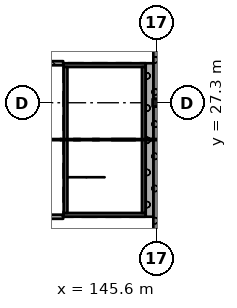
"""IFC4 building model, lengths in metres.
Left out: names, types, materials, properties, quantities, classifications, styles, units other than length and angle.
Written with IfcOpenShell. Run it as: python <this file> out.ifc"""

import sys

from ifc_helpers import new_model, si_unit, direction, frame, frame_2d, origin, origin_2d, place, context, subcontext, project, spatial, rectangle, extrude, element, fill, save


model = new_model("IFC4")
c1 = context("Model", 3, precision=1e-05, world=origin(), true_north=direction((0.0, 1.0)))
c2 = subcontext(c1, "Body", "Model", "MODEL_VIEW")
j1 = project(units=[si_unit("LENGTHUNIT", "METRE"), si_unit("PLANEANGLEUNIT", "RADIAN")], contexts=[c1])
p1 = place(None, origin())
s1 = spatial("IfcSite", under=j1, at=p1, CompositionType="ELEMENT")
p2 = place(p1, origin())
s2 = spatial("IfcBuilding", under=s1, at=p2, CompositionType="ELEMENT")
p3 = place(p2, frame((0.0, 0.0, 29.12)))
s3 = spatial("IfcBuildingStorey", under=s2, at=p3, CompositionType="ELEMENT", Elevation=29.12)
p4 = place(p3, frame((145.6, 27.3, 0.0), z_axis=(0.0, 0.0, 1.0), x_axis=(1.0, 0.0, 0.0)))
e1 = element("IfcColumn", 1, at=p4, inside=s3, PredefinedType="COLUMN", context=c2, shape_type="SweptSolid", body=[
    extrude(rectangle(XDim=0.5, YDim=0.5, at=origin_2d()), origin(), (0.0, 0.0, 1.0), 4.55),
])
p5 = place(p3, frame((144.9, 19.925, 0.0), z_axis=(0.0, 0.0, 1.0), x_axis=(-1.0, 0.0, 0.0)))
e2 = element("IfcWall", 2, at=p5, inside=s3, PredefinedType="SHEAR", context=c2, shape_type="SweptSolid", body=[
    extrude(rectangle(XDim=5.4, YDim=0.25, at=frame_2d((2.7, 0.0))), origin(), (0.0, 0.0, 1.0), 4.55),
])
p6 = place(p5, frame((1.5, 0.0, 0.0)))
e3 = element("IfcOpeningElement", 3, at=p6, cuts=e2, PredefinedType="OPENING", context=c2, shape_type="SweptSolid", body=[
    extrude(rectangle(XDim=2.4, YDim=2.1, at=frame_2d((1.2, 1.05))), frame((0.0, 0.135, 0.0), z_axis=(0.0, -1.0, 0.0), x_axis=(1.0, 0.0, 0.0)), (0.0, 0.0, 1.0), 0.27),
])
p7 = place(p3, frame((144.9, 29.775, 0.0), z_axis=(0.0, 0.0, 1.0), x_axis=(-1.0, 0.0, 0.0)))
e4 = element("IfcWall", 4, at=p7, inside=s3, PredefinedType="SHEAR", context=c2, shape_type="SweptSolid", body=[
    extrude(rectangle(XDim=5.4, YDim=0.25, at=frame_2d((2.7, 0.0))), origin(), (0.0, 0.0, 1.0), 4.55),
])
for number, where, z_axis, x_axis in (
    (5, (139.625, 29.65, 0.0), (0.0, 0.0, 1.0), (0.0, -1.0, 0.0)),
    (6, (144.775, 29.65, 0.0), (0.0, 0.0, 1.0), (0.0, -1.0, 0.0)),
):
    element("IfcWall", number, at=place(p3, frame(where, z_axis=z_axis, x_axis=x_axis)), inside=s3, PredefinedType="SHEAR", context=c2, shape_type="SweptSolid", body=[
        extrude(rectangle(XDim=9.6, YDim=0.25, at=frame_2d((4.8, 0.0))), origin(), (0.0, 0.0, 1.0), 4.55),
    ])
p8 = place(p3, frame((145.575, 18.45, 0.0), z_axis=(0.0, 0.0, 1.0), x_axis=(0.0, 1.0, 0.0)))
e7 = element("IfcWall", 7, at=p8, inside=s3, PredefinedType="SOLIDWALL", context=c2, shape_type="SweptSolid", body=[
    extrude(rectangle(XDim=8.6, YDim=0.35, at=frame_2d((4.3, 0.0))), origin(), (0.0, 0.0, 1.0), 4.5),
])
p9 = place(p3, frame((145.575, 27.55, 0.0), z_axis=(0.0, 0.0, 1.0), x_axis=(0.0, 1.0, 0.0)))
e8 = element("IfcWall", 8, at=p9, inside=s3, PredefinedType="SOLIDWALL", context=c2, shape_type="SweptSolid", body=[
    extrude(rectangle(XDim=8.6, YDim=0.35, at=frame_2d((4.3, 0.0))), origin(), (0.0, 0.0, 1.0), 4.5),
])
p10 = place(p3, frame((145.15, 19.8, 0.0), z_axis=(0.0, 0.0, 1.0), x_axis=(0.0, 1.0, 0.0)))
e9 = element("IfcWall", 9, at=p10, inside=s3, PredefinedType="SOLIDWALL", context=c2, shape_type="SweptSolid", body=[
    extrude(rectangle(XDim=10.1, YDim=0.5, at=frame_2d((5.05, 0.0))), origin(), (0.0, 0.0, 1.0), 4.55),
])
p11 = place(p3, frame((135.83, 29.9, 0.0), z_axis=(0.0, 0.0, 1.0), x_axis=(1.0, 0.0, 0.0)))
e10 = element("IfcWall", 10, at=p11, inside=s3, PredefinedType="SOLIDWALL", context=c2, shape_type="SweptSolid", body=[
    extrude(rectangle(XDim=3.64, YDim=0.275, at=frame_2d((1.82, 0.0))), origin(), (0.0, 0.0, 1.0), 3.88),
])
p12 = place(p3, frame((136.613, 19.8, 0.0), z_axis=(0.0, 0.0, 1.0), x_axis=(1.0, 0.0, 0.0)))
e11 = element("IfcWall", 11, at=p12, inside=s3, PredefinedType="SOLIDWALL", context=c2, shape_type="SweptSolid", body=[
    extrude(rectangle(XDim=2.857, YDim=0.275, at=frame_2d((1.429, 0.0))), origin(), (0.0, 0.0, 1.0), 3.88),
])
p13 = place(p12, frame((0.85, 0.0, 0.0)))
e12 = element("IfcOpeningElement", 12, at=p13, cuts=e11, PredefinedType="OPENING", context=c2, shape_type="SweptSolid", body=[
    extrude(rectangle(XDim=1.2, YDim=2.4, at=frame_2d((0.6, 1.2))), frame((0.0, 0.147, 0.0), z_axis=(0.0, -1.0, 0.0), x_axis=(1.0, 0.0, 0.0)), (0.0, 0.0, 1.0), 0.295),
])
p14 = place(p6, origin())
e13 = element("IfcDoor", 13, at=p14, inside=s3, OperationType="DOUBLE_DOOR_SINGLE_SWING", PredefinedType="DOOR", context=c2, shape_type="SweptSolid", body=[
    extrude(rectangle(XDim=2.4, YDim=2.1, at=frame_2d((1.2, 1.05))), frame((0.0, 0.025, 0.0), z_axis=(0.0, -1.0, 0.0), x_axis=(1.0, 0.0, 0.0)), (0.0, 0.0, 1.0), 0.05),
])
fill(e3, e13)
save(model, sys.argv[1])
